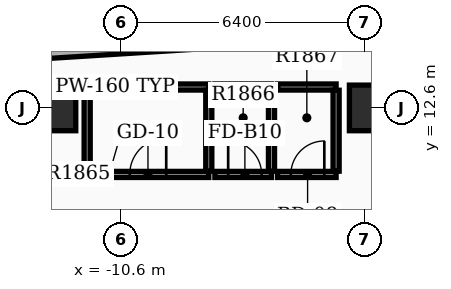
"""IFC4 building model, lengths in metres.
Left out: names, types, materials, properties, quantities, classifications, styles, units other than length and angle.
Written with IfcOpenShell. Run it as: python <this file> out.ifc"""

import sys

from ifc_helpers import new_model, si_unit, direction, frame, frame_2d, origin, origin_2d, place, context, subcontext, project, spatial, rectangle, extrude, element, fill, save


model = new_model("IFC4")
c1 = context("Model", 3, precision=1e-05, world=origin(), true_north=direction((0.0, 1.0)))
c2 = subcontext(c1, "Body", "Model", "MODEL_VIEW")
j1 = project(units=[si_unit("LENGTHUNIT", "METRE"), si_unit("PLANEANGLEUNIT", "RADIAN")], contexts=[c1])
p1 = place(None, origin())
s1 = spatial("IfcSite", under=j1, at=p1, CompositionType="ELEMENT")
p2 = place(p1, origin())
s2 = spatial("IfcBuilding", under=s1, at=p2, CompositionType="ELEMENT")
p3 = place(p2, frame((0.0, 0.0, 120.3)))
s3 = spatial("IfcBuildingStorey", under=s2, at=p3, CompositionType="ELEMENT", Elevation=120.3)
for number, where, z_axis, x_axis in (
    (1, (-12.4, 12.6, 0.0), (0.0, 0.0, 1.0), (1.0, 0.0, 0.0)),
    (2, (-4.0, 12.6, 0.0), (0.0, 0.0, 1.0), (1.0, 0.0, 0.0)),
):
    element("IfcColumn", number, at=place(p3, frame(where, z_axis=z_axis, x_axis=x_axis)), inside=s3, PredefinedType="COLUMN", context=c2, shape_type="SweptSolid", body=[
        extrude(rectangle(XDim=1.2, YDim=1.2, at=origin_2d()), origin(), (0.0, 0.0, 1.0), 3.9),
    ])
p4 = place(p3, frame((-14.063, 13.945, 0.0), z_axis=(0.0, 0.0, 1.0), x_axis=(0.998027314704, 0.062781200242, 0.0)))
e3 = element("IfcWall", 3, at=p4, inside=s3, PredefinedType="STANDARD", context=c2, shape_type="SweptSolid", body=[
    extrude(rectangle(XDim=6.3, YDim=0.28, at=frame_2d((3.15, 0.0))), origin(), (0.0, 0.0, 1.0), 2.97),
])
p5 = place(p3, frame((-11.5, 10.85, 0.0), z_axis=(0.0, 0.0, 1.0), x_axis=(1.0, 0.0, 0.0)))
e4 = element("IfcWall", 4, at=p5, inside=s3, PredefinedType="PARTITIONING", context=c2, shape_type="SweptSolid", body=[
    extrude(rectangle(XDim=3.2, YDim=0.16, at=frame_2d((1.6, 0.0))), origin(), (0.0, 0.0, 1.0), 2.96),
])
p6 = place(p5, frame((1.12, 0.0, 0.0)))
e5 = element("IfcOpeningElement", 5, at=p6, cuts=e4, PredefinedType="OPENING", context=c2, shape_type="SweptSolid", body=[
    extrude(rectangle(XDim=0.96, YDim=2.15, at=frame_2d((0.48, 1.075))), frame((0.0, 0.09, 0.0), z_axis=(0.0, -1.0, 0.0), x_axis=(1.0, 0.0, 0.0)), (0.0, 0.0, 1.0), 0.18),
])
p7 = place(p3, frame((-11.5, 13.15, 0.0), z_axis=(0.0, 0.0, 1.0), x_axis=(1.0, 0.0, 0.0)))
e6 = element("IfcWall", 6, at=p7, inside=s3, PredefinedType="PARTITIONING", context=c2, shape_type="SweptSolid", body=[
    extrude(rectangle(XDim=3.2, YDim=0.16, at=frame_2d((1.6, 0.0))), origin(), (0.0, 0.0, 1.0), 2.96),
])
for number, where, z_axis, x_axis in (
    (7, (-11.5, 10.935, 0.0), (0.0, 0.0, 1.0), (0.0, 1.0, 0.0)),
    (8, (-8.3, 10.935, 0.0), (0.0, 0.0, 1.0), (0.0, 1.0, 0.0)),
):
    element("IfcWall", number, at=place(p3, frame(where, z_axis=z_axis, x_axis=x_axis)), inside=s3, PredefinedType="PARTITIONING", context=c2, shape_type="SweptSolid", body=[
        extrude(rectangle(XDim=2.13, YDim=0.16, at=frame_2d((1.065, 0.0))), origin(), (0.0, 0.0, 1.0), 2.96),
    ])
p8 = place(p3, frame((-8.14, 10.85, 0.0), z_axis=(0.0, 0.0, 1.0), x_axis=(1.0, 0.0, 0.0)))
e9 = element("IfcWall", 9, at=p8, inside=s3, PredefinedType="PARTITIONING", context=c2, shape_type="SweptSolid", body=[
    extrude(rectangle(XDim=1.49, YDim=0.16, at=frame_2d((0.745, 0.0))), origin(), (0.0, 0.0, 1.0), 2.96),
])
p9 = place(p8, frame((0.35, 0.0, 0.0)))
e10 = element("IfcOpeningElement", 10, at=p9, cuts=e9, PredefinedType="OPENING", context=c2, shape_type="SweptSolid", body=[
    extrude(rectangle(XDim=0.88, YDim=2.1, at=frame_2d((0.44, 1.05))), frame((0.0, 0.09, 0.0), z_axis=(0.0, -1.0, 0.0), x_axis=(1.0, 0.0, 0.0)), (0.0, 0.0, 1.0), 0.18),
])
p10 = place(p3, frame((-8.14, 13.15, 0.0), z_axis=(0.0, 0.0, 1.0), x_axis=(1.0, 0.0, 0.0)))
e11 = element("IfcWall", 11, at=p10, inside=s3, PredefinedType="PARTITIONING", context=c2, shape_type="SweptSolid", body=[
    extrude(rectangle(XDim=1.49, YDim=0.16, at=frame_2d((0.745, 0.0))), origin(), (0.0, 0.0, 1.0), 2.96),
])
p11 = place(p3, frame((-6.65, 10.935, 0.0), z_axis=(0.0, 0.0, 1.0), x_axis=(0.0, 1.0, 0.0)))
e12 = element("IfcWall", 12, at=p11, inside=s3, PredefinedType="PARTITIONING", context=c2, shape_type="SweptSolid", body=[
    extrude(rectangle(XDim=2.13, YDim=0.16, at=frame_2d((1.065, 0.0))), origin(), (0.0, 0.0, 1.0), 2.96),
])
p12 = place(p3, frame((-6.49, 10.85, 0.0), z_axis=(0.0, 0.0, 1.0), x_axis=(1.0, 0.0, 0.0)))
e13 = element("IfcWall", 13, at=p12, inside=s3, PredefinedType="PARTITIONING", context=c2, shape_type="SweptSolid", body=[
    extrude(rectangle(XDim=1.54, YDim=0.16, at=frame_2d((0.77, 0.0))), origin(), (0.0, 0.0, 1.0), 2.96),
])
p13 = place(p12, frame((0.35, 0.0, 0.0)))
e14 = element("IfcOpeningElement", 14, at=p13, cuts=e13, PredefinedType="OPENING", context=c2, shape_type="SweptSolid", body=[
    extrude(rectangle(XDim=0.88, YDim=2.15, at=frame_2d((0.44, 1.075))), frame((0.0, 0.09, 0.0), z_axis=(0.0, -1.0, 0.0), x_axis=(1.0, 0.0, 0.0)), (0.0, 0.0, 1.0), 0.18),
])
p14 = place(p3, frame((-6.49, 13.15, 0.0), z_axis=(0.0, 0.0, 1.0), x_axis=(1.0, 0.0, 0.0)))
e15 = element("IfcWall", 15, at=p14, inside=s3, PredefinedType="PARTITIONING", context=c2, shape_type="SweptSolid", body=[
    extrude(rectangle(XDim=1.54, YDim=0.16, at=frame_2d((0.77, 0.0))), origin(), (0.0, 0.0, 1.0), 2.96),
])
p15 = place(p3, frame((-4.95, 10.935, 0.0), z_axis=(0.0, 0.0, 1.0), x_axis=(0.0, 1.0, 0.0)))
e16 = element("IfcWall", 16, at=p15, inside=s3, PredefinedType="PARTITIONING", context=c2, shape_type="SweptSolid", body=[
    extrude(rectangle(XDim=2.13, YDim=0.16, at=frame_2d((1.065, 0.0))), origin(), (0.0, 0.0, 1.0), 2.96),
])
p16 = place(p6, origin())
e17 = element("IfcDoor", 17, at=p16, inside=s3, OperationType="SINGLE_SWING_RIGHT", PredefinedType="DOOR", context=c2, shape_type="SweptSolid", body=[
    extrude(rectangle(XDim=0.96, YDim=2.15, at=frame_2d((0.48, 1.075))), frame((0.0, 0.025, 0.0), z_axis=(0.0, -1.0, 0.0), x_axis=(1.0, 0.0, 0.0)), (0.0, 0.0, 1.0), 0.05),
])
fill(e5, e17)
p17 = place(p9, origin())
e18 = element("IfcDoor", 18, at=p17, inside=s3, OperationType="SINGLE_SWING_LEFT", PredefinedType="DOOR", context=c2, shape_type="SweptSolid", body=[
    extrude(rectangle(XDim=0.88, YDim=2.1, at=frame_2d((0.44, 1.05))), frame((0.0, 0.025, 0.0), z_axis=(0.0, -1.0, 0.0), x_axis=(1.0, 0.0, 0.0)), (0.0, 0.0, 1.0), 0.05),
])
fill(e10, e18)
p18 = place(p13, origin())
e19 = element("IfcDoor", 19, at=p18, inside=s3, OperationType="SINGLE_SWING_RIGHT", PredefinedType="DOOR", context=c2, shape_type="SweptSolid", body=[
    extrude(rectangle(XDim=0.88, YDim=2.15, at=frame_2d((0.44, 1.075))), frame((0.0, 0.025, 0.0), z_axis=(0.0, -1.0, 0.0), x_axis=(1.0, 0.0, 0.0)), (0.0, 0.0, 1.0), 0.05),
])
fill(e14, e19)
save(model, sys.argv[1])
